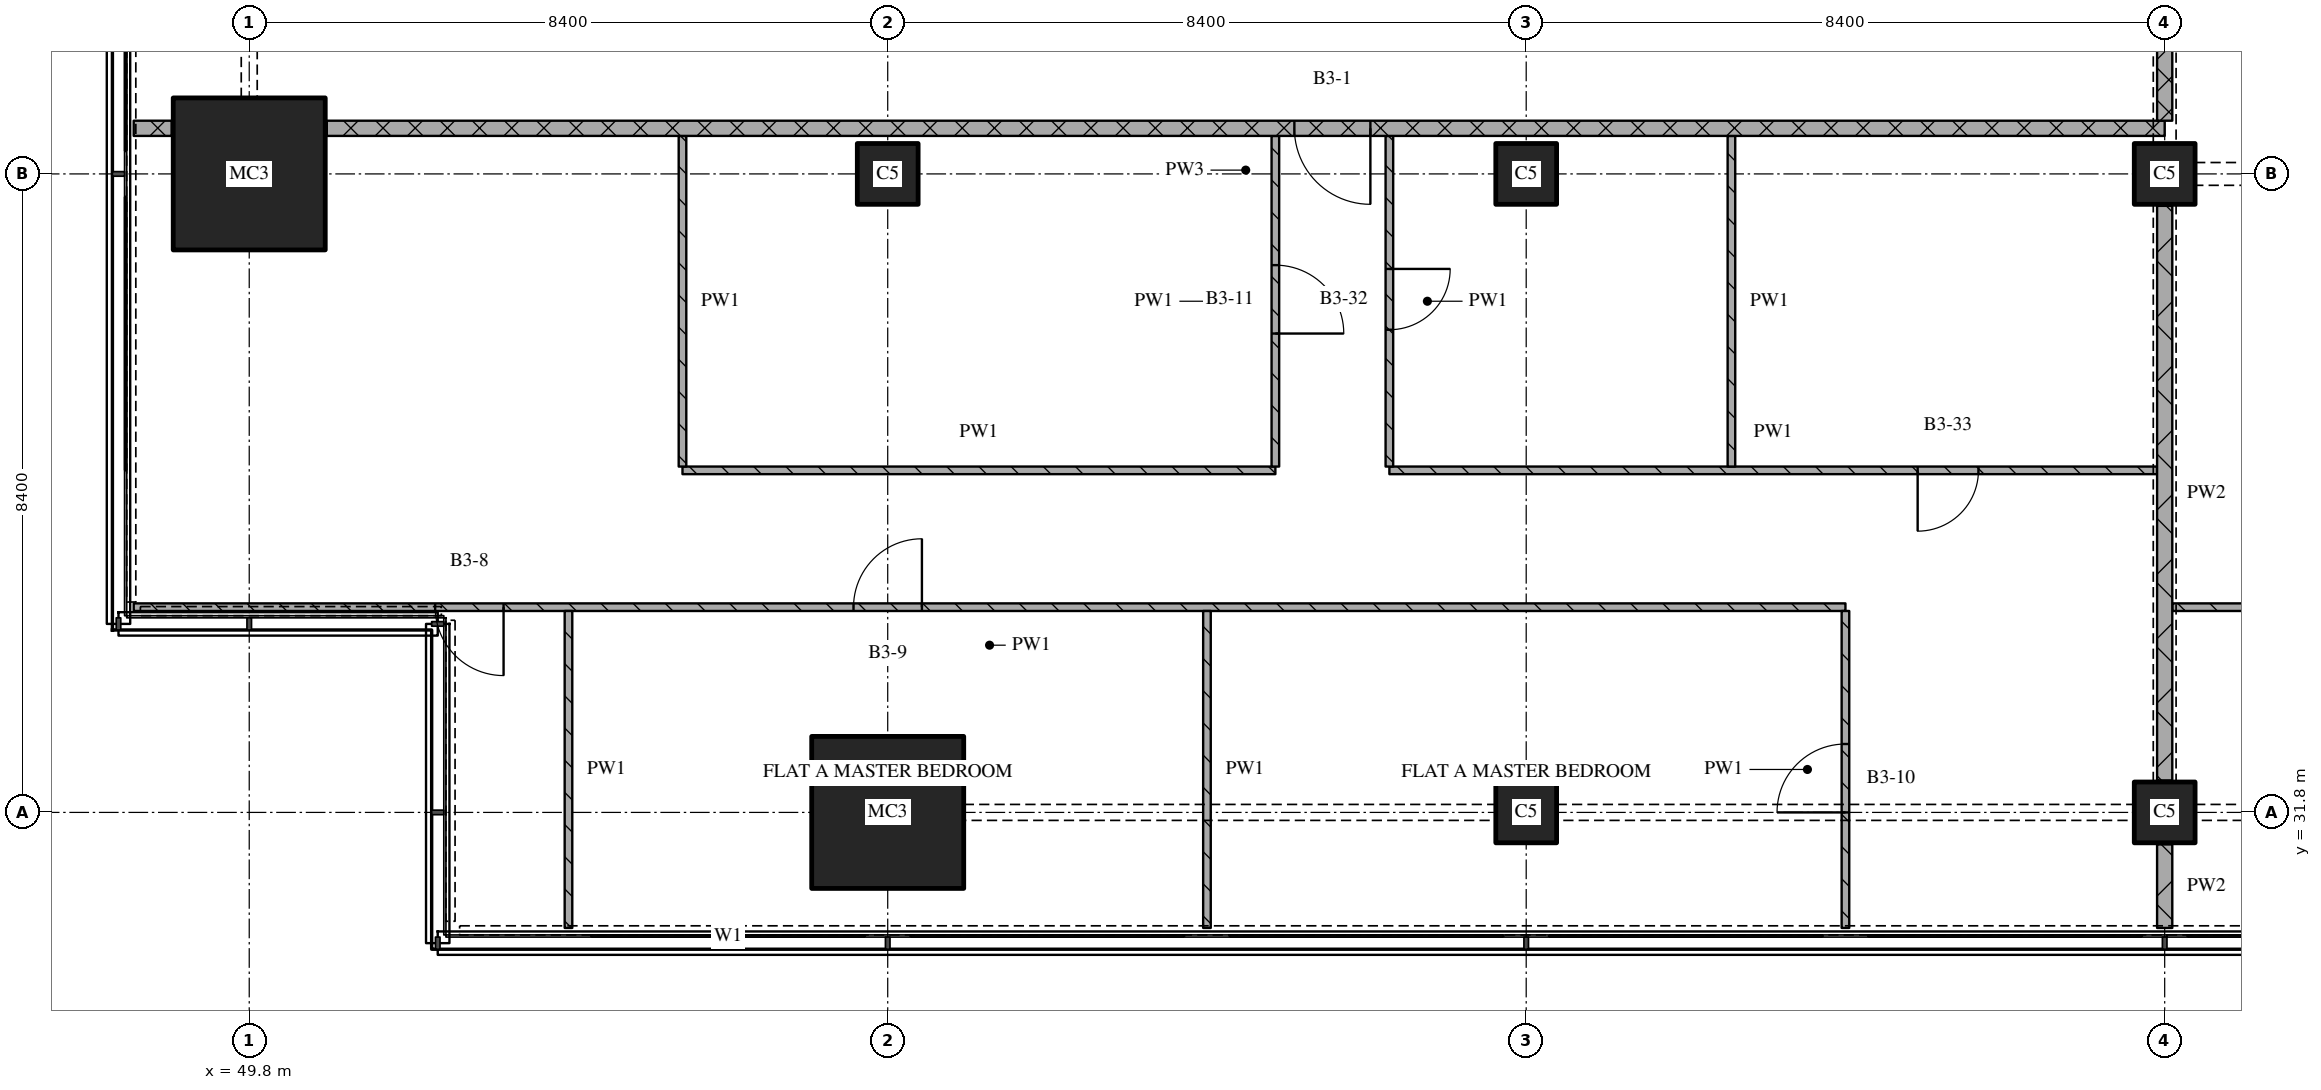
"""IFC4 building model, lengths in metres.
Left out: names, types, materials, properties, quantities, classifications, styles, units other than length and angle.
Written with IfcOpenShell. Run it as: python <this file> out.ifc"""

import sys

from ifc_helpers import new_model, si_unit, direction, frame, frame_2d, origin, origin_2d, place, context, subcontext, project, spatial, rectangle, extrude, element, fill, save


model = new_model("IFC4")
c1 = context("Model", 3, precision=1e-05, world=origin(), true_north=direction((0.0, 1.0)))
c2 = subcontext(c1, "Body", "Model", "MODEL_VIEW")
j1 = project(units=[si_unit("LENGTHUNIT", "METRE"), si_unit("PLANEANGLEUNIT", "RADIAN")], contexts=[c1])
p1 = place(None, origin())
s1 = spatial("IfcSite", under=j1, at=p1, CompositionType="ELEMENT")
p2 = place(p1, origin())
s2 = spatial("IfcBuilding", under=s1, at=p2, CompositionType="ELEMENT")
p3 = place(p2, frame((0.0, 0.0, 120.45)))
s3 = spatial("IfcBuildingStorey", under=s2, at=p3, CompositionType="ELEMENT", Elevation=120.45)
for number, where, z_axis, x_axis in (
    (1, (49.8, 40.2, 0.0), (0.0, 0.0, 1.0), (1.0, 0.0, 0.0)),
    (2, (58.2, 31.8, 0.0), (0.0, 0.0, 1.0), (1.0, 0.0, 0.0)),
):
    element("IfcColumn", number, at=place(p3, frame(where, z_axis=z_axis, x_axis=x_axis)), inside=s3, PredefinedType="COLUMN", context=c2, shape_type="SweptSolid", body=[
        extrude(rectangle(XDim=2.0, YDim=2.0, at=origin_2d()), origin(), (0.0, 0.0, 1.0), 3.6),
    ])
for number, where, z_axis, x_axis in (
    (3, (58.2, 40.2, 0.0), (0.0, 0.0, 1.0), (1.0, 0.0, 0.0)),
    (4, (66.6, 31.8, 0.0), (0.0, 0.0, 1.0), (1.0, 0.0, 0.0)),
    (5, (66.6, 40.2, 0.0), (0.0, 0.0, 1.0), (1.0, 0.0, 0.0)),
    (6, (75.0, 31.8, 0.0), (0.0, 0.0, 1.0), (1.0, 0.0, 0.0)),
    (7, (75.0, 40.2, 0.0), (0.0, 0.0, 1.0), (1.0, 0.0, 0.0)),
):
    element("IfcColumn", number, at=place(p3, frame(where, z_axis=z_axis, x_axis=x_axis)), inside=s3, PredefinedType="COLUMN", context=c2, shape_type="SweptSolid", body=[
        extrude(rectangle(XDim=0.8, YDim=0.8, at=origin_2d()), origin(), (0.0, 0.0, 1.0), 3.6),
    ])
p4 = place(p3, frame((70.8, 34.5, 0.0), z_axis=(0.0, 0.0, 1.0), x_axis=(-1.0, 0.0, 0.0)))
e8 = element("IfcWall", 8, at=p4, inside=s3, PredefinedType="PARTITIONING", context=c2, shape_type="SweptSolid", body=[
    extrude(rectangle(XDim=22.52, YDim=0.1, at=frame_2d((11.26, 0.0))), origin(), (0.0, 0.0, 1.0), 3.32),
])
p5 = place(p4, frame((12.15, 0.0, 0.0)))
e9 = element("IfcOpeningElement", 9, at=p5, cuts=e8, PredefinedType="OPENING", context=c2, shape_type="SweptSolid", body=[
    extrude(rectangle(XDim=0.9, YDim=2.1, at=frame_2d((0.45, 1.05))), frame((0.0, 0.06, 0.0), z_axis=(0.0, -1.0, 0.0), x_axis=(1.0, 0.0, 0.0)), (0.0, 0.0, 1.0), 0.12),
])
p6 = place(p4, frame((17.654, 0.0, 0.0)))
e10 = element("IfcOpeningElement", 10, at=p6, cuts=e8, PredefinedType="OPENING", context=c2, shape_type="SweptSolid", body=[
    extrude(rectangle(XDim=0.9, YDim=2.1, at=frame_2d((0.45, 1.05))), frame((0.0, 0.06, 0.0), z_axis=(0.0, -1.0, 0.0), x_axis=(1.0, 0.0, 0.0)), (0.0, 0.0, 1.0), 0.12),
])
p7 = place(p3, frame((96.0, 34.5, 0.0), z_axis=(0.0, 0.0, 1.0), x_axis=(-1.0, 0.0, 0.0)))
e11 = element("IfcWall", 11, at=p7, inside=s3, PredefinedType="PARTITIONING", context=c2, shape_type="SweptSolid", body=[
    extrude(rectangle(XDim=20.9, YDim=0.1, at=frame_2d((10.45, 0.0))), origin(), (0.0, 0.0, 1.0), 3.32),
])
p8 = place(p7, frame((10.05, 0.0, 0.0)))
e12 = element("IfcOpeningElement", 12, at=p8, cuts=e11, PredefinedType="OPENING", context=c2, shape_type="SweptSolid", body=[
    extrude(rectangle(XDim=0.9, YDim=2.1, at=frame_2d((0.45, 1.05))), frame((0.0, 0.06, 0.0), z_axis=(0.0, -1.0, 0.0), x_axis=(1.0, 0.0, 0.0)), (0.0, 0.0, 1.0), 0.12),
])
p9 = place(p7, frame((16.35, 0.0, 0.0)))
e13 = element("IfcOpeningElement", 13, at=p9, cuts=e11, PredefinedType="OPENING", context=c2, shape_type="SweptSolid", body=[
    extrude(rectangle(XDim=0.9, YDim=2.1, at=frame_2d((0.45, 1.05))), frame((0.0, 0.06, 0.0), z_axis=(0.0, -1.0, 0.0), x_axis=(1.0, 0.0, 0.0)), (0.0, 0.0, 1.0), 0.12),
])
p10 = place(p3, frame((55.5, 36.3, 0.0), z_axis=(0.0, 0.0, 1.0), x_axis=(1.0, 0.0, 0.0)))
e14 = element("IfcWall", 14, at=p10, inside=s3, PredefinedType="PARTITIONING", context=c2, shape_type="SweptSolid", body=[
    extrude(rectangle(XDim=7.8, YDim=0.1, at=frame_2d((3.9, 0.0))), origin(), (0.0, 0.0, 1.0), 3.32),
])
p11 = place(p3, frame((64.8, 36.3, 0.0), z_axis=(0.0, 0.0, 1.0), x_axis=(1.0, 0.0, 0.0)))
e15 = element("IfcWall", 15, at=p11, inside=s3, PredefinedType="PARTITIONING", context=c2, shape_type="SweptSolid", body=[
    extrude(rectangle(XDim=10.1, YDim=0.1, at=frame_2d((5.05, 0.0))), origin(), (0.0, 0.0, 1.0), 3.32),
])
p12 = place(p11, frame((6.95, 0.0, 0.0)))
e16 = element("IfcOpeningElement", 16, at=p12, cuts=e15, PredefinedType="OPENING", context=c2, shape_type="SweptSolid", body=[
    extrude(rectangle(XDim=0.8, YDim=2.1, at=frame_2d((0.4, 1.05))), frame((0.0, 0.06, 0.0), z_axis=(0.0, -1.0, 0.0), x_axis=(1.0, 0.0, 0.0)), (0.0, 0.0, 1.0), 0.12),
])
p13 = place(p3, frame((48.28, 40.8, 0.0), z_axis=(0.0, 0.0, 1.0), x_axis=(1.0, 0.0, 0.0)))
e17 = element("IfcWall", 17, at=p13, inside=s3, PredefinedType="PARTITIONING", context=c2, shape_type="SweptSolid", body=[
    extrude(rectangle(XDim=0.5, YDim=0.2, at=frame_2d((0.25, 0.0))), origin(), (0.0, 0.0, 1.0), 3.32),
])
p14 = place(p3, frame((75.0, 40.8, 0.0), z_axis=(0.0, 0.0, 1.0), x_axis=(-1.0, 0.0, 0.0)))
e18 = element("IfcWall", 18, at=p14, inside=s3, PredefinedType="PARTITIONING", context=c2, shape_type="SweptSolid", body=[
    extrude(rectangle(XDim=24.18, YDim=0.2, at=frame_2d((12.09, 0.0))), origin(), (0.0, 0.0, 1.0), 3.32),
])
p15 = place(p14, frame((10.45, 0.0, 0.0)))
e19 = element("IfcOpeningElement", 19, at=p15, cuts=e18, PredefinedType="OPENING", context=c2, shape_type="SweptSolid", body=[
    extrude(rectangle(XDim=1.0, YDim=2.1, at=frame_2d((0.5, 1.05))), frame((0.0, 0.11, 0.0), z_axis=(0.0, -1.0, 0.0), x_axis=(1.0, 0.0, 0.0)), (0.0, 0.0, 1.0), 0.22),
])
p16 = place(p3, frame((54.0, 34.45, 0.0), z_axis=(0.0, 0.0, 1.0), x_axis=(0.0, -1.0, 0.0)))
e20 = element("IfcWall", 20, at=p16, inside=s3, PredefinedType="PARTITIONING", context=c2, shape_type="SweptSolid", body=[
    extrude(rectangle(XDim=4.17, YDim=0.1, at=frame_2d((2.085, 0.0))), origin(), (0.0, 0.0, 1.0), 3.32),
])
p17 = place(p3, frame((55.5, 40.7, 0.0), z_axis=(0.0, 0.0, 1.0), x_axis=(0.0, -1.0, 0.0)))
e21 = element("IfcWall", 21, at=p17, inside=s3, PredefinedType="PARTITIONING", context=c2, shape_type="SweptSolid", body=[
    extrude(rectangle(XDim=4.35, YDim=0.1, at=frame_2d((2.175, 0.0))), origin(), (0.0, 0.0, 1.0), 3.32),
])
p18 = place(p3, frame((62.4, 34.45, 0.0), z_axis=(0.0, 0.0, 1.0), x_axis=(0.0, -1.0, 0.0)))
e22 = element("IfcWall", 22, at=p18, inside=s3, PredefinedType="PARTITIONING", context=c2, shape_type="SweptSolid", body=[
    extrude(rectangle(XDim=4.17, YDim=0.1, at=frame_2d((2.085, 0.0))), origin(), (0.0, 0.0, 1.0), 3.32),
])
p19 = place(p3, frame((63.3, 36.35, 0.0), z_axis=(0.0, 0.0, 1.0), x_axis=(0.0, 1.0, 0.0)))
e23 = element("IfcWall", 23, at=p19, inside=s3, PredefinedType="PARTITIONING", context=c2, shape_type="SweptSolid", body=[
    extrude(rectangle(XDim=4.35, YDim=0.1, at=frame_2d((2.175, 0.0))), origin(), (0.0, 0.0, 1.0), 3.32),
])
p20 = place(p19, frame((1.75, 0.0, 0.0)))
e24 = element("IfcOpeningElement", 24, at=p20, cuts=e23, PredefinedType="OPENING", context=c2, shape_type="SweptSolid", body=[
    extrude(rectangle(XDim=0.9, YDim=2.1, at=frame_2d((0.45, 1.05))), frame((0.0, 0.06, 0.0), z_axis=(0.0, -1.0, 0.0), x_axis=(1.0, 0.0, 0.0)), (0.0, 0.0, 1.0), 0.12),
])
p21 = place(p3, frame((64.8, 40.7, 0.0), z_axis=(0.0, 0.0, 1.0), x_axis=(0.0, -1.0, 0.0)))
e25 = element("IfcWall", 25, at=p21, inside=s3, PredefinedType="PARTITIONING", context=c2, shape_type="SweptSolid", body=[
    extrude(rectangle(XDim=4.35, YDim=0.1, at=frame_2d((2.175, 0.0))), origin(), (0.0, 0.0, 1.0), 3.32),
])
p22 = place(p21, frame((1.75, 0.0, 0.0)))
e26 = element("IfcOpeningElement", 26, at=p22, cuts=e25, PredefinedType="OPENING", context=c2, shape_type="SweptSolid", body=[
    extrude(rectangle(XDim=0.8, YDim=2.1, at=frame_2d((0.4, 1.05))), frame((0.0, 0.06, 0.0), z_axis=(0.0, -1.0, 0.0), x_axis=(1.0, 0.0, 0.0)), (0.0, 0.0, 1.0), 0.12),
])
p23 = place(p3, frame((69.3, 40.7, 0.0), z_axis=(0.0, 0.0, 1.0), x_axis=(0.0, -1.0, 0.0)))
e27 = element("IfcWall", 27, at=p23, inside=s3, PredefinedType="PARTITIONING", context=c2, shape_type="SweptSolid", body=[
    extrude(rectangle(XDim=4.35, YDim=0.1, at=frame_2d((2.175, 0.0))), origin(), (0.0, 0.0, 1.0), 3.32),
])
p24 = place(p3, frame((70.8, 30.28, 0.0), z_axis=(0.0, 0.0, 1.0), x_axis=(0.0, 1.0, 0.0)))
e28 = element("IfcWall", 28, at=p24, inside=s3, PredefinedType="PARTITIONING", context=c2, shape_type="SweptSolid", body=[
    extrude(rectangle(XDim=4.17, YDim=0.1, at=frame_2d((2.085, 0.0))), origin(), (0.0, 0.0, 1.0), 3.32),
])
p25 = place(p24, frame((1.52, 0.0, 0.0)))
e29 = element("IfcOpeningElement", 29, at=p25, cuts=e28, PredefinedType="OPENING", context=c2, shape_type="SweptSolid", body=[
    extrude(rectangle(XDim=0.9, YDim=2.1, at=frame_2d((0.45, 1.05))), frame((0.0, 0.06, 0.0), z_axis=(0.0, -1.0, 0.0), x_axis=(1.0, 0.0, 0.0)), (0.0, 0.0, 1.0), 0.12),
])
p26 = place(p3, frame((75.0, 43.1, 0.0), z_axis=(0.0, 0.0, 1.0), x_axis=(0.0, -1.0, 0.0)))
e30 = element("IfcWall", 30, at=p26, inside=s3, PredefinedType="PARTITIONING", context=c2, shape_type="SweptSolid", body=[
    extrude(rectangle(XDim=2.2, YDim=0.2, at=frame_2d((1.1, 0.0))), origin(), (0.0, 0.0, 1.0), 2.43),
])
p27 = place(p3, frame((75.0, 31.38, 0.0), z_axis=(0.0, 0.0, 1.0), x_axis=(0.0, -1.0, 0.0)))
e31 = element("IfcWall", 31, at=p27, inside=s3, PredefinedType="PARTITIONING", context=c2, shape_type="SweptSolid", body=[
    extrude(rectangle(XDim=1.1, YDim=0.2, at=frame_2d((0.55, 0.0))), origin(), (0.0, 0.0, 1.0), 3.32),
])
p28 = place(p3, frame((75.0, 39.78, 0.0), z_axis=(0.0, 0.0, 1.0), x_axis=(0.0, -1.0, 0.0)))
e32 = element("IfcWall", 32, at=p28, inside=s3, PredefinedType="PARTITIONING", context=c2, shape_type="SweptSolid", body=[
    extrude(rectangle(XDim=7.56, YDim=0.2, at=frame_2d((3.78, 0.0))), origin(), (0.0, 0.0, 1.0), 2.83),
])
p29 = place(p5, origin())
e33 = element("IfcDoor", 33, at=p29, inside=s3, OperationType="SINGLE_SWING_RIGHT", PredefinedType="DOOR", context=c2, shape_type="SweptSolid", body=[
    extrude(rectangle(XDim=0.9, YDim=2.1, at=frame_2d((0.45, 1.05))), frame((0.0, 0.025, 0.0), z_axis=(0.0, -1.0, 0.0), x_axis=(1.0, 0.0, 0.0)), (0.0, 0.0, 1.0), 0.05),
])
fill(e9, e33)
p30 = place(p6, origin())
e34 = element("IfcDoor", 34, at=p30, inside=s3, OperationType="SINGLE_SWING_LEFT", PredefinedType="DOOR", context=c2, shape_type="SweptSolid", body=[
    extrude(rectangle(XDim=0.9, YDim=2.1, at=frame_2d((0.45, 1.05))), frame((0.0, 0.025, 0.0), z_axis=(0.0, -1.0, 0.0), x_axis=(1.0, 0.0, 0.0)), (0.0, 0.0, 1.0), 0.05),
])
fill(e10, e34)
p31 = place(p12, origin())
e35 = element("IfcDoor", 35, at=p31, inside=s3, OperationType="SINGLE_SWING_RIGHT", PredefinedType="DOOR", context=c2, shape_type="SweptSolid", body=[
    extrude(rectangle(XDim=0.8, YDim=2.1, at=frame_2d((0.4, 1.05))), frame((0.0, 0.025, 0.0), z_axis=(0.0, -1.0, 0.0), x_axis=(1.0, 0.0, 0.0)), (0.0, 0.0, 1.0), 0.05),
])
fill(e16, e35)
p32 = place(p15, origin())
e36 = element("IfcDoor", 36, at=p32, inside=s3, OperationType="SINGLE_SWING_LEFT", PredefinedType="DOOR", context=c2, shape_type="SweptSolid", body=[
    extrude(rectangle(XDim=1.0, YDim=2.1, at=frame_2d((0.5, 1.05))), frame((0.0, 0.025, 0.0), z_axis=(0.0, -1.0, 0.0), x_axis=(1.0, 0.0, 0.0)), (0.0, 0.0, 1.0), 0.05),
])
fill(e19, e36)
p33 = place(p20, origin())
e37 = element("IfcDoor", 37, at=p33, inside=s3, OperationType="SINGLE_SWING_RIGHT", PredefinedType="DOOR", context=c2, shape_type="SweptSolid", body=[
    extrude(rectangle(XDim=0.9, YDim=2.1, at=frame_2d((0.45, 1.05))), frame((0.0, 0.025, 0.0), z_axis=(0.0, -1.0, 0.0), x_axis=(1.0, 0.0, 0.0)), (0.0, 0.0, 1.0), 0.05),
])
fill(e24, e37)
p34 = place(p22, origin())
e38 = element("IfcDoor", 38, at=p34, inside=s3, OperationType="SINGLE_SWING_LEFT", PredefinedType="DOOR", context=c2, shape_type="SweptSolid", body=[
    extrude(rectangle(XDim=0.8, YDim=2.1, at=frame_2d((0.4, 1.05))), frame((0.0, 0.025, 0.0), z_axis=(0.0, -1.0, 0.0), x_axis=(1.0, 0.0, 0.0)), (0.0, 0.0, 1.0), 0.05),
])
fill(e26, e38)
p35 = place(p25, origin())
e39 = element("IfcDoor", 39, at=p35, inside=s3, OperationType="SINGLE_SWING_LEFT", PredefinedType="DOOR", context=c2, shape_type="SweptSolid", body=[
    extrude(rectangle(XDim=0.9, YDim=2.1, at=frame_2d((0.45, 1.05))), frame((0.0, 0.025, 0.0), z_axis=(0.0, -1.0, 0.0), x_axis=(1.0, 0.0, 0.0)), (0.0, 0.0, 1.0), 0.05),
])
fill(e29, e39)
save(model, sys.argv[1])
